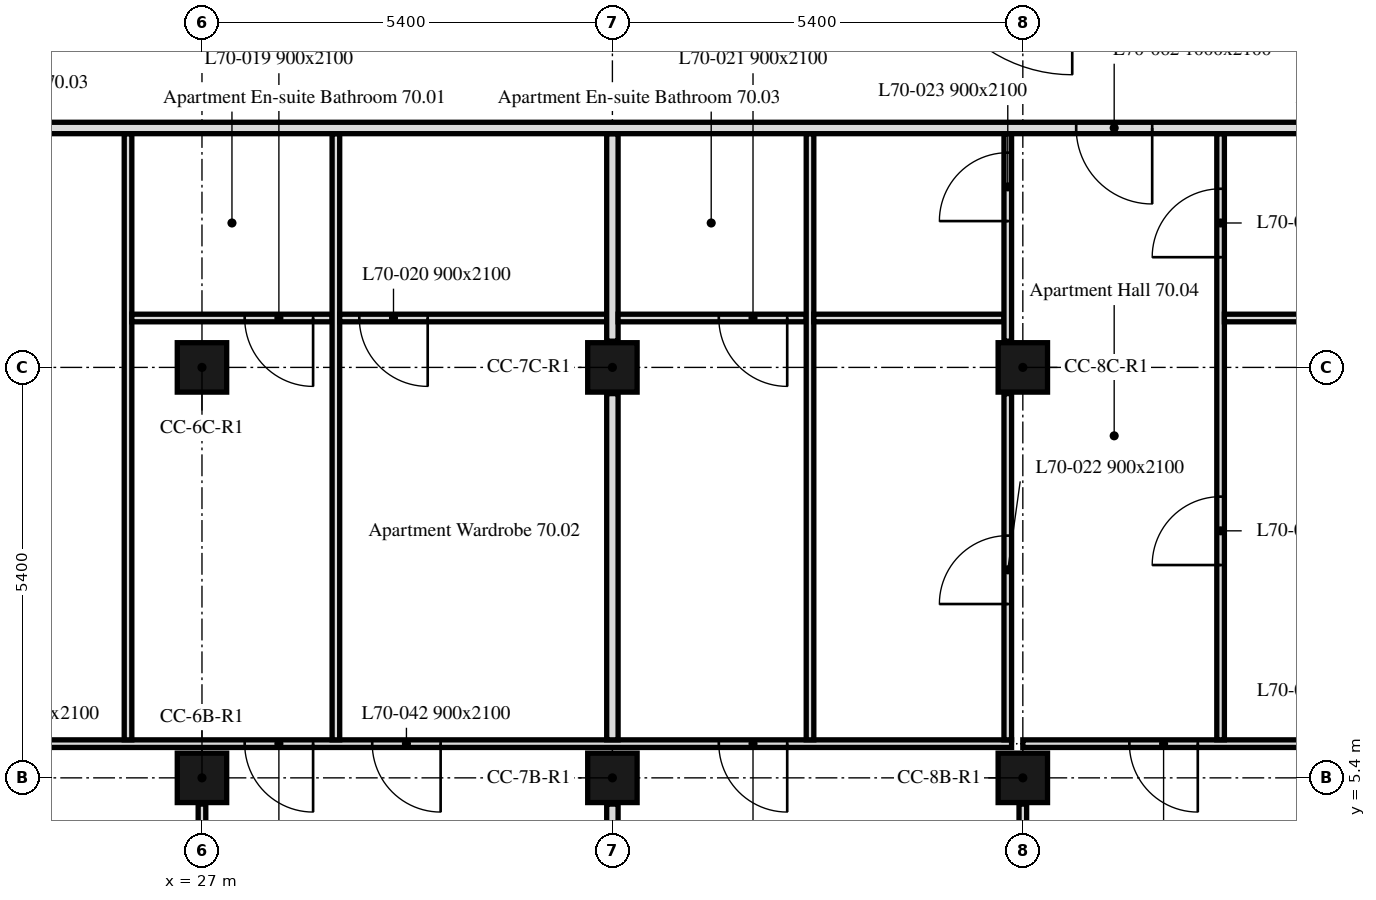
"""IFC4 building model, lengths in metres.
Left out: names, types, materials, properties, quantities, classifications, styles, units other than length and angle.
Written with IfcOpenShell. Run it as: python <this file> out.ifc"""

import sys

from ifc_helpers import new_model, si_unit, direction, frame, frame_2d, origin, origin_2d, place, context, subcontext, project, spatial, rectangle, extrude, element, fill, save


model = new_model("IFC4")
c1 = context("Model", 3, precision=1e-05, world=origin(), true_north=direction((0.0, 1.0)))
c2 = subcontext(c1, "Body", "Model", "MODEL_VIEW")
j1 = project(units=[si_unit("LENGTHUNIT", "METRE"), si_unit("PLANEANGLEUNIT", "RADIAN")], contexts=[c1])
p1 = place(None, origin())
s1 = spatial("IfcSite", under=j1, at=p1, CompositionType="ELEMENT")
p2 = place(p1, origin())
s2 = spatial("IfcBuilding", under=s1, at=p2, CompositionType="ELEMENT")
p3 = place(p2, frame((0.0, 0.0, 285.1)))
s3 = spatial("IfcBuildingStorey", under=s2, at=p3, CompositionType="ELEMENT", Elevation=285.1)
for number, where, z_axis, x_axis in (
    (1, (27.0, 5.4, 0.0), (0.0, 0.0, 1.0), (1.0, 0.0, 0.0)),
    (2, (32.4, 5.4, 0.0), (0.0, 0.0, 1.0), (1.0, 0.0, 0.0)),
    (3, (37.8, 5.4, 0.0), (0.0, 0.0, 1.0), (1.0, 0.0, 0.0)),
    (4, (27.0, 10.8, 0.0), (0.0, 0.0, 1.0), (1.0, 0.0, 0.0)),
    (5, (32.4, 10.8, 0.0), (0.0, 0.0, 1.0), (1.0, 0.0, 0.0)),
    (6, (37.8, 10.8, 0.0), (0.0, 0.0, 1.0), (1.0, 0.0, 0.0)),
):
    element("IfcColumn", number, at=place(p3, frame(where, z_axis=z_axis, x_axis=x_axis)), inside=s3, PredefinedType="COLUMN", context=c2, shape_type="SweptSolid", body=[
        extrude(rectangle(XDim=0.65, YDim=0.65, at=origin_2d()), origin(), (0.0, 0.0, 1.0), 3.0),
    ])
p4 = place(p3, frame((37.652, 5.85, 0.0), z_axis=(0.0, 0.0, 1.0), x_axis=(-1.0, 0.0, 0.0)))
e7 = element("IfcWall", 7, at=p4, inside=s3, PredefinedType="PARTITIONING", context=c2, shape_type="SweptSolid", body=[
    extrude(rectangle(XDim=31.501, YDim=0.1, at=frame_2d((15.75, 0.0))), origin(), (0.0, 0.0, 1.0), 2.4),
])
p5 = place(p4, frame((12.923, 0.0, 0.0)))
e8 = element("IfcOpeningElement", 8, at=p5, cuts=e7, PredefinedType="OPENING", context=c2, shape_type="SweptSolid", body=[
    extrude(rectangle(XDim=0.9, YDim=2.1, at=frame_2d((0.45, 1.05))), frame((0.0, 0.05, 0.0), z_axis=(0.0, -1.0, 0.0), x_axis=(1.0, 0.0, 0.0)), (0.0, 0.0, 1.0), 0.1),
])
p6 = place(p4, frame((29.422, 0.0, 0.0)))
e9 = element("IfcOpeningElement", 9, at=p6, cuts=e7, PredefinedType="OPENING", context=c2, shape_type="SweptSolid", body=[
    extrude(rectangle(XDim=0.9, YDim=2.1, at=frame_2d((0.45, 1.05))), frame((0.0, 0.05, 0.0), z_axis=(0.0, -1.0, 0.0), x_axis=(1.0, 0.0, 0.0)), (0.0, 0.0, 1.0), 0.1),
])
p7 = place(p4, frame((28.182, 0.0, 0.0)))
e10 = element("IfcOpeningElement", 10, at=p7, cuts=e7, PredefinedType="OPENING", context=c2, shape_type="SweptSolid", body=[
    extrude(rectangle(XDim=0.9, YDim=2.1, at=frame_2d((0.45, 1.05))), frame((0.0, 0.05, 0.0), z_axis=(0.0, -1.0, 0.0), x_axis=(1.0, 0.0, 0.0)), (0.0, 0.0, 1.0), 0.1),
])
p8 = place(p4, frame((23.942, 0.0, 0.0)))
e11 = element("IfcOpeningElement", 11, at=p8, cuts=e7, PredefinedType="OPENING", context=c2, shape_type="SweptSolid", body=[
    extrude(rectangle(XDim=0.9, YDim=2.1, at=frame_2d((0.45, 1.05))), frame((0.0, 0.05, 0.0), z_axis=(0.0, -1.0, 0.0), x_axis=(1.0, 0.0, 0.0)), (0.0, 0.0, 1.0), 0.1),
])
p9 = place(p4, frame((22.572, 0.0, 0.0)))
e12 = element("IfcOpeningElement", 12, at=p9, cuts=e7, PredefinedType="OPENING", context=c2, shape_type="SweptSolid", body=[
    extrude(rectangle(XDim=0.9, YDim=2.1, at=frame_2d((0.45, 1.05))), frame((0.0, 0.05, 0.0), z_axis=(0.0, -1.0, 0.0), x_axis=(1.0, 0.0, 0.0)), (0.0, 0.0, 1.0), 0.1),
])
p10 = place(p4, frame((19.466, 0.0, 0.0)))
e13 = element("IfcOpeningElement", 13, at=p10, cuts=e7, PredefinedType="OPENING", context=c2, shape_type="SweptSolid", body=[
    extrude(rectangle(XDim=0.9, YDim=2.1, at=frame_2d((0.45, 1.05))), frame((0.0, 0.05, 0.0), z_axis=(0.0, -1.0, 0.0), x_axis=(1.0, 0.0, 0.0)), (0.0, 0.0, 1.0), 0.1),
])
p11 = place(p4, frame((9.19, 0.0, 0.0)))
e14 = element("IfcOpeningElement", 14, at=p11, cuts=e7, PredefinedType="OPENING", context=c2, shape_type="SweptSolid", body=[
    extrude(rectangle(XDim=0.9, YDim=2.1, at=frame_2d((0.45, 1.05))), frame((0.0, 0.05, 0.0), z_axis=(0.0, -1.0, 0.0), x_axis=(1.0, 0.0, 0.0)), (0.0, 0.0, 1.0), 0.1),
])
p12 = place(p4, frame((7.512, 0.0, 0.0)))
e15 = element("IfcOpeningElement", 15, at=p12, cuts=e7, PredefinedType="OPENING", context=c2, shape_type="SweptSolid", body=[
    extrude(rectangle(XDim=0.9, YDim=2.1, at=frame_2d((0.45, 1.05))), frame((0.0, 0.05, 0.0), z_axis=(0.0, -1.0, 0.0), x_axis=(1.0, 0.0, 0.0)), (0.0, 0.0, 1.0), 0.1),
])
p13 = place(p4, frame((2.952, 0.0, 0.0)))
e16 = element("IfcOpeningElement", 16, at=p13, cuts=e7, PredefinedType="OPENING", context=c2, shape_type="SweptSolid", body=[
    extrude(rectangle(XDim=0.9, YDim=2.1, at=frame_2d((0.45, 1.05))), frame((0.0, 0.05, 0.0), z_axis=(0.0, -1.0, 0.0), x_axis=(1.0, 0.0, 0.0)), (0.0, 0.0, 1.0), 0.1),
])
p14 = place(p4, frame((18.096, 0.0, 0.0)))
e17 = element("IfcOpeningElement", 17, at=p14, cuts=e7, PredefinedType="OPENING", context=c2, shape_type="SweptSolid", body=[
    extrude(rectangle(XDim=0.9, YDim=2.1, at=frame_2d((0.45, 1.05))), frame((0.0, 0.05, 0.0), z_axis=(0.0, -1.0, 0.0), x_axis=(1.0, 0.0, 0.0)), (0.0, 0.0, 1.0), 0.1),
])
p15 = place(p3, frame((27.0, 0.751, 0.0), z_axis=(0.0, 0.0, 1.0), x_axis=(0.0, 1.0, 0.0)))
e18 = element("IfcWall", 18, at=p15, inside=s3, PredefinedType="PARTITIONING", context=c2, shape_type="SweptSolid", body=[
    extrude(rectangle(XDim=4.304, YDim=0.1, at=frame_2d((2.152, 0.0))), origin(), (0.0, 0.0, 1.0), 2.4),
])
p16 = place(p15, frame((1.18, 0.0, 0.0)))
e19 = element("IfcOpeningElement", 19, at=p16, cuts=e18, PredefinedType="OPENING", context=c2, shape_type="SweptSolid", body=[
    extrude(rectangle(XDim=0.9, YDim=2.1, at=frame_2d((0.45, 1.05))), frame((0.0, 0.05, 0.0), z_axis=(0.0, -1.0, 0.0), x_axis=(1.0, 0.0, 0.0)), (0.0, 0.0, 1.0), 0.1),
])
p17 = place(p3, frame((32.4, 0.751, 0.0), z_axis=(0.0, 0.0, 1.0), x_axis=(0.0, 1.0, 0.0)))
e20 = element("IfcWall", 20, at=p17, inside=s3, PredefinedType="PARTITIONING", context=c2, shape_type="SweptSolid", body=[
    extrude(rectangle(XDim=4.304, YDim=0.15, at=frame_2d((2.152, 0.0))), origin(), (0.0, 0.0, 1.0), 2.4),
])
p18 = place(p3, frame((26.027, 5.9, 0.0), z_axis=(0.0, 0.0, 1.0), x_axis=(0.0, 1.0, 0.0)))
e21 = element("IfcWall", 21, at=p18, inside=s3, PredefinedType="PARTITIONING", context=c2, shape_type="SweptSolid", body=[
    extrude(rectangle(XDim=7.975, YDim=0.1, at=frame_2d((3.988, 0.0))), origin(), (0.0, 0.0, 1.0), 3.0),
])
p19 = place(p3, frame((28.712, 11.45, 0.0), z_axis=(0.0, 0.0, 1.0), x_axis=(-1.0, 0.0, 0.0)))
e22 = element("IfcWall", 22, at=p19, inside=s3, PredefinedType="PARTITIONING", context=c2, shape_type="SweptSolid", body=[
    extrude(rectangle(XDim=2.635, YDim=0.1, at=frame_2d((1.317, 0.0))), origin(), (0.0, 0.0, 1.0), 2.4),
])
p20 = place(p19, frame((0.25, 0.0, 0.0)))
e23 = element("IfcOpeningElement", 23, at=p20, cuts=e22, PredefinedType="OPENING", context=c2, shape_type="SweptSolid", body=[
    extrude(rectangle(XDim=0.9, YDim=2.1, at=frame_2d((0.45, 1.05))), frame((0.0, 0.05, 0.0), z_axis=(0.0, -1.0, 0.0), x_axis=(1.0, 0.0, 0.0)), (0.0, 0.0, 1.0), 0.1),
])
p21 = place(p3, frame((28.762, 5.9, 0.0), z_axis=(0.0, 0.0, 1.0), x_axis=(0.0, 1.0, 0.0)))
e24 = element("IfcWall", 24, at=p21, inside=s3, PredefinedType="PARTITIONING", context=c2, shape_type="SweptSolid", body=[
    extrude(rectangle(XDim=7.975, YDim=0.1, at=frame_2d((3.988, 0.0))), origin(), (0.0, 0.0, 1.0), 3.0),
])
p22 = place(p3, frame((32.4, 5.9, 0.0), z_axis=(0.0, 0.0, 1.0), x_axis=(0.0, 1.0, 0.0)))
e25 = element("IfcWall", 25, at=p22, inside=s3, PredefinedType="PARTITIONING", context=c2, shape_type="SweptSolid", body=[
    extrude(rectangle(XDim=4.555, YDim=0.15, at=frame_2d((2.278, 0.0))), origin(), (0.0, 0.0, 1.0), 2.4),
])
p23 = place(p3, frame((32.325, 11.45, 0.0), z_axis=(0.0, 0.0, 1.0), x_axis=(-1.0, 0.0, 0.0)))
e26 = element("IfcWall", 26, at=p23, inside=s3, PredefinedType="PARTITIONING", context=c2, shape_type="SweptSolid", body=[
    extrude(rectangle(XDim=3.513, YDim=0.1, at=frame_2d((1.756, 0.0))), origin(), (0.0, 0.0, 1.0), 3.0),
])
p24 = place(p23, frame((2.355, 0.0, 0.0)))
e27 = element("IfcOpeningElement", 27, at=p24, cuts=e26, PredefinedType="OPENING", context=c2, shape_type="SweptSolid", body=[
    extrude(rectangle(XDim=0.9, YDim=2.1, at=frame_2d((0.45, 1.05))), frame((0.0, 0.05, 0.0), z_axis=(0.0, -1.0, 0.0), x_axis=(1.0, 0.0, 0.0)), (0.0, 0.0, 1.0), 0.1),
])
p25 = place(p3, frame((32.4, 11.145, 0.0), z_axis=(0.0, 0.0, 1.0), x_axis=(0.0, 1.0, 0.0)))
e28 = element("IfcWall", 28, at=p25, inside=s3, PredefinedType="PARTITIONING", context=c2, shape_type="SweptSolid", body=[
    extrude(rectangle(XDim=2.73, YDim=0.15, at=frame_2d((1.365, 0.0))), origin(), (0.0, 0.0, 1.0), 2.4),
])
p26 = place(p3, frame((37.8, 0.751, 0.0), z_axis=(0.0, 0.0, 1.0), x_axis=(0.0, 1.0, 0.0)))
e29 = element("IfcWall", 29, at=p26, inside=s3, PredefinedType="PARTITIONING", context=c2, shape_type="SweptSolid", body=[
    extrude(rectangle(XDim=4.304, YDim=0.1, at=frame_2d((2.152, 0.0))), origin(), (0.0, 0.0, 1.0), 2.4),
])
p27 = place(p26, frame((1.18, 0.0, 0.0)))
e30 = element("IfcOpeningElement", 30, at=p27, cuts=e29, PredefinedType="OPENING", context=c2, shape_type="SweptSolid", body=[
    extrude(rectangle(XDim=0.9, YDim=2.1, at=frame_2d((0.45, 1.05))), frame((0.0, 0.05, 0.0), z_axis=(0.0, -1.0, 0.0), x_axis=(1.0, 0.0, 0.0)), (0.0, 0.0, 1.0), 0.1),
])
p28 = place(p3, frame((43.15, 5.85, 0.0), z_axis=(0.0, 0.0, 1.0), x_axis=(-1.0, 0.0, 0.0)))
e31 = element("IfcWall", 31, at=p28, inside=s3, PredefinedType="PARTITIONING", context=c2, shape_type="SweptSolid", body=[
    extrude(rectangle(XDim=5.35, YDim=0.1, at=frame_2d((2.675, 0.0))), origin(), (0.0, 0.0, 1.0), 3.0),
])
p29 = place(p28, frame((3.048, 0.0, 0.0)))
e32 = element("IfcOpeningElement", 32, at=p29, cuts=e31, PredefinedType="OPENING", context=c2, shape_type="SweptSolid", body=[
    extrude(rectangle(XDim=0.9, YDim=2.1, at=frame_2d((0.45, 1.05))), frame((0.0, 0.05, 0.0), z_axis=(0.0, -1.0, 0.0), x_axis=(1.0, 0.0, 0.0)), (0.0, 0.0, 1.0), 0.1),
])
p30 = place(p3, frame((34.95, 11.45, 0.0), z_axis=(0.0, 0.0, 1.0), x_axis=(-1.0, 0.0, 0.0)))
e33 = element("IfcWall", 33, at=p30, inside=s3, PredefinedType="PARTITIONING", context=c2, shape_type="SweptSolid", body=[
    extrude(rectangle(XDim=2.475, YDim=0.1, at=frame_2d((1.237, 0.0))), origin(), (0.0, 0.0, 1.0), 3.0),
])
p31 = place(p30, frame((0.25, 0.0, 0.0)))
e34 = element("IfcOpeningElement", 34, at=p31, cuts=e33, PredefinedType="OPENING", context=c2, shape_type="SweptSolid", body=[
    extrude(rectangle(XDim=0.9, YDim=2.1, at=frame_2d((0.45, 1.05))), frame((0.0, 0.05, 0.0), z_axis=(0.0, -1.0, 0.0), x_axis=(1.0, 0.0, 0.0)), (0.0, 0.0, 1.0), 0.1),
])
p32 = place(p3, frame((35.0, 5.9, 0.0), z_axis=(0.0, 0.0, 1.0), x_axis=(0.0, 1.0, 0.0)))
e35 = element("IfcWall", 35, at=p32, inside=s3, PredefinedType="PARTITIONING", context=c2, shape_type="SweptSolid", body=[
    extrude(rectangle(XDim=7.975, YDim=0.1, at=frame_2d((3.988, 0.0))), origin(), (0.0, 0.0, 1.0), 2.4),
])
p33 = place(p3, frame((37.602, 5.9, 0.0), z_axis=(0.0, 0.0, 1.0), x_axis=(0.0, 1.0, 0.0)))
e36 = element("IfcWall", 36, at=p33, inside=s3, PredefinedType="PARTITIONING", context=c2, shape_type="SweptSolid", body=[
    extrude(rectangle(XDim=4.555, YDim=0.1, at=frame_2d((2.278, 0.0))), origin(), (0.0, 0.0, 1.0), 2.4),
])
p34 = place(p33, frame((1.787, 0.0, 0.0)))
e37 = element("IfcOpeningElement", 37, at=p34, cuts=e36, PredefinedType="OPENING", context=c2, shape_type="SweptSolid", body=[
    extrude(rectangle(XDim=0.9, YDim=2.1, at=frame_2d((0.45, 1.05))), frame((0.0, 0.05, 0.0), z_axis=(0.0, -1.0, 0.0), x_axis=(1.0, 0.0, 0.0)), (0.0, 0.0, 1.0), 0.1),
])
p35 = place(p3, frame((37.552, 11.45, 0.0), z_axis=(0.0, 0.0, 1.0), x_axis=(-1.0, 0.0, 0.0)))
e38 = element("IfcWall", 38, at=p35, inside=s3, PredefinedType="PARTITIONING", context=c2, shape_type="SweptSolid", body=[
    extrude(rectangle(XDim=2.502, YDim=0.1, at=frame_2d((1.251, 0.0))), origin(), (0.0, 0.0, 1.0), 3.0),
])
p36 = place(p3, frame((37.602, 11.145, 0.0), z_axis=(0.0, 0.0, 1.0), x_axis=(0.0, 1.0, 0.0)))
e39 = element("IfcWall", 39, at=p36, inside=s3, PredefinedType="PARTITIONING", context=c2, shape_type="SweptSolid", body=[
    extrude(rectangle(XDim=2.73, YDim=0.1, at=frame_2d((1.365, 0.0))), origin(), (0.0, 0.0, 1.0), 2.4),
])
p37 = place(p36, frame((1.58, 0.0, 0.0)))
e40 = element("IfcOpeningElement", 40, at=p37, cuts=e39, PredefinedType="OPENING", context=c2, shape_type="SweptSolid", body=[
    extrude(rectangle(XDim=0.9, YDim=2.1, at=frame_2d((0.45, 1.05))), frame((0.0, 0.05, 0.0), z_axis=(0.0, -1.0, 0.0), x_axis=(1.0, 0.0, 0.0)), (0.0, 0.0, 1.0), 0.1),
])
p38 = place(p3, frame((40.402, 5.9, 0.0), z_axis=(0.0, 0.0, 1.0), x_axis=(0.0, 1.0, 0.0)))
e41 = element("IfcWall", 41, at=p38, inside=s3, PredefinedType="PARTITIONING", context=c2, shape_type="SweptSolid", body=[
    extrude(rectangle(XDim=7.975, YDim=0.1, at=frame_2d((3.988, 0.0))), origin(), (0.0, 0.0, 1.0), 2.4),
])
p39 = place(p38, frame((2.3, 0.0, 0.0)))
e42 = element("IfcOpeningElement", 42, at=p39, cuts=e41, PredefinedType="OPENING", context=c2, shape_type="SweptSolid", body=[
    extrude(rectangle(XDim=0.9, YDim=2.1, at=frame_2d((0.45, 1.05))), frame((0.0, 0.05, 0.0), z_axis=(0.0, -1.0, 0.0), x_axis=(1.0, 0.0, 0.0)), (0.0, 0.0, 1.0), 0.1),
])
p40 = place(p38, frame((6.35, 0.0, 0.0)))
e43 = element("IfcOpeningElement", 43, at=p40, cuts=e41, PredefinedType="OPENING", context=c2, shape_type="SweptSolid", body=[
    extrude(rectangle(XDim=0.9, YDim=2.1, at=frame_2d((0.45, 1.05))), frame((0.0, 0.05, 0.0), z_axis=(0.0, -1.0, 0.0), x_axis=(1.0, 0.0, 0.0)), (0.0, 0.0, 1.0), 0.1),
])
p41 = place(p3, frame((43.231, 11.45, 0.0), z_axis=(0.0, 0.0, 1.0), x_axis=(-1.0, 0.0, 0.0)))
e44 = element("IfcWall", 44, at=p41, inside=s3, PredefinedType="PARTITIONING", context=c2, shape_type="SweptSolid", body=[
    extrude(rectangle(XDim=2.779, YDim=0.1, at=frame_2d((1.39, 0.0))), origin(), (0.0, 0.0, 1.0), 3.0),
])
p42 = place(p3, frame((47.849, 13.95, 0.0), z_axis=(0.0, 0.0, 1.0), x_axis=(-1.0, 0.0, 0.0)))
e45 = element("IfcWall", 45, at=p42, inside=s3, PredefinedType="PARTITIONING", context=c2, shape_type="SweptSolid", body=[
    extrude(rectangle(XDim=41.698, YDim=0.15, at=frame_2d((20.849, 0.0))), origin(), (0.0, 0.0, 1.0), 2.4),
])
p43 = place(p42, frame((37.749, 0.0, 0.0)))
e46 = element("IfcOpeningElement", 46, at=p43, cuts=e45, PredefinedType="OPENING", context=c2, shape_type="SweptSolid", body=[
    extrude(rectangle(XDim=1.0, YDim=2.1, at=frame_2d((0.5, 1.05))), frame((0.0, 0.075, 0.0), z_axis=(0.0, -1.0, 0.0), x_axis=(1.0, 0.0, 0.0)), (0.0, 0.0, 1.0), 0.15),
])
p44 = place(p42, frame((32.244, 0.0, 0.0)))
e47 = element("IfcOpeningElement", 47, at=p44, cuts=e45, PredefinedType="OPENING", context=c2, shape_type="SweptSolid", body=[
    extrude(rectangle(XDim=1.0, YDim=2.1, at=frame_2d((0.5, 1.05))), frame((0.0, 0.075, 0.0), z_axis=(0.0, -1.0, 0.0), x_axis=(1.0, 0.0, 0.0)), (0.0, 0.0, 1.0), 0.15),
])
p45 = place(p42, frame((27.735, 0.0, 0.0)))
e48 = element("IfcOpeningElement", 48, at=p45, cuts=e45, PredefinedType="OPENING", context=c2, shape_type="SweptSolid", body=[
    extrude(rectangle(XDim=1.0, YDim=2.1, at=frame_2d((0.5, 1.05))), frame((0.0, 0.075, 0.0), z_axis=(0.0, -1.0, 0.0), x_axis=(1.0, 0.0, 0.0)), (0.0, 0.0, 1.0), 0.15),
])
p46 = place(p42, frame((8.347, 0.0, 0.0)))
e49 = element("IfcOpeningElement", 49, at=p46, cuts=e45, PredefinedType="OPENING", context=c2, shape_type="SweptSolid", body=[
    extrude(rectangle(XDim=1.0, YDim=2.1, at=frame_2d((0.5, 1.05))), frame((0.0, 0.075, 0.0), z_axis=(0.0, -1.0, 0.0), x_axis=(1.0, 0.0, 0.0)), (0.0, 0.0, 1.0), 0.15),
])
p47 = place(p20, origin())
e50 = element("IfcDoor", 50, at=p47, inside=s3, OperationType="SINGLE_SWING_LEFT", PredefinedType="DOOR", context=c2, shape_type="SweptSolid", body=[
    extrude(rectangle(XDim=0.9, YDim=2.1, at=frame_2d((0.45, 1.05))), frame((0.0, 0.025, 0.0), z_axis=(0.0, -1.0, 0.0), x_axis=(1.0, 0.0, 0.0)), (0.0, 0.0, 1.0), 0.05),
])
fill(e23, e50)
p48 = place(p24, origin())
e51 = element("IfcDoor", 51, at=p48, inside=s3, OperationType="SINGLE_SWING_LEFT", PredefinedType="DOOR", context=c2, shape_type="SweptSolid", body=[
    extrude(rectangle(XDim=0.9, YDim=2.1, at=frame_2d((0.45, 1.05))), frame((0.0, 0.025, 0.0), z_axis=(0.0, -1.0, 0.0), x_axis=(1.0, 0.0, 0.0)), (0.0, 0.0, 1.0), 0.05),
])
fill(e27, e51)
p49 = place(p31, origin())
e52 = element("IfcDoor", 52, at=p49, inside=s3, OperationType="SINGLE_SWING_RIGHT", PredefinedType="DOOR", context=c2, shape_type="SweptSolid", body=[
    extrude(rectangle(XDim=0.9, YDim=2.1, at=frame_2d((0.45, 1.05))), frame((0.0, 0.025, 0.0), z_axis=(0.0, -1.0, 0.0), x_axis=(1.0, 0.0, 0.0)), (0.0, 0.0, 1.0), 0.05),
])
fill(e34, e52)
p50 = place(p34, origin())
e53 = element("IfcDoor", 53, at=p50, inside=s3, OperationType="SINGLE_SWING_LEFT", PredefinedType="DOOR", context=c2, shape_type="SweptSolid", body=[
    extrude(rectangle(XDim=0.9, YDim=2.1, at=frame_2d((0.45, 1.05))), frame((0.0, 0.025, 0.0), z_axis=(0.0, -1.0, 0.0), x_axis=(1.0, 0.0, 0.0)), (0.0, 0.0, 1.0), 0.05),
])
fill(e37, e53)
p51 = place(p37, origin())
e54 = element("IfcDoor", 54, at=p51, inside=s3, OperationType="SINGLE_SWING_RIGHT", PredefinedType="DOOR", context=c2, shape_type="SweptSolid", body=[
    extrude(rectangle(XDim=0.9, YDim=2.1, at=frame_2d((0.45, 1.05))), frame((0.0, 0.025, 0.0), z_axis=(0.0, -1.0, 0.0), x_axis=(1.0, 0.0, 0.0)), (0.0, 0.0, 1.0), 0.05),
])
fill(e40, e54)
p52 = place(p39, origin())
e55 = element("IfcDoor", 55, at=p52, inside=s3, OperationType="SINGLE_SWING_RIGHT", PredefinedType="DOOR", context=c2, shape_type="SweptSolid", body=[
    extrude(rectangle(XDim=0.9, YDim=2.1, at=frame_2d((0.45, 1.05))), frame((0.0, 0.025, 0.0), z_axis=(0.0, -1.0, 0.0), x_axis=(1.0, 0.0, 0.0)), (0.0, 0.0, 1.0), 0.05),
])
fill(e42, e55)
p53 = place(p40, origin())
e56 = element("IfcDoor", 56, at=p53, inside=s3, OperationType="SINGLE_SWING_RIGHT", PredefinedType="DOOR", context=c2, shape_type="SweptSolid", body=[
    extrude(rectangle(XDim=0.9, YDim=2.1, at=frame_2d((0.45, 1.05))), frame((0.0, 0.025, 0.0), z_axis=(0.0, -1.0, 0.0), x_axis=(1.0, 0.0, 0.0)), (0.0, 0.0, 1.0), 0.05),
])
fill(e43, e56)
p54 = place(p11, origin())
e57 = element("IfcDoor", 57, at=p54, inside=s3, OperationType="SINGLE_SWING_LEFT", PredefinedType="DOOR", context=c2, shape_type="SweptSolid", body=[
    extrude(rectangle(XDim=0.9, YDim=2.1, at=frame_2d((0.45, 1.05))), frame((0.0, 0.025, 0.0), z_axis=(0.0, -1.0, 0.0), x_axis=(1.0, 0.0, 0.0)), (0.0, 0.0, 1.0), 0.05),
])
fill(e14, e57)
p55 = place(p12, origin())
e58 = element("IfcDoor", 58, at=p55, inside=s3, OperationType="SINGLE_SWING_RIGHT", PredefinedType="DOOR", context=c2, shape_type="SweptSolid", body=[
    extrude(rectangle(XDim=0.9, YDim=2.1, at=frame_2d((0.45, 1.05))), frame((0.0, 0.025, 0.0), z_axis=(0.0, -1.0, 0.0), x_axis=(1.0, 0.0, 0.0)), (0.0, 0.0, 1.0), 0.05),
])
fill(e15, e58)
p56 = place(p13, origin())
e59 = element("IfcDoor", 59, at=p56, inside=s3, OperationType="SINGLE_SWING_RIGHT", PredefinedType="DOOR", context=c2, shape_type="SweptSolid", body=[
    extrude(rectangle(XDim=0.9, YDim=2.1, at=frame_2d((0.45, 1.05))), frame((0.0, 0.025, 0.0), z_axis=(0.0, -1.0, 0.0), x_axis=(1.0, 0.0, 0.0)), (0.0, 0.0, 1.0), 0.05),
])
fill(e16, e59)
p57 = place(p29, origin())
e60 = element("IfcDoor", 60, at=p57, inside=s3, OperationType="SINGLE_SWING_RIGHT", PredefinedType="DOOR", context=c2, shape_type="SweptSolid", body=[
    extrude(rectangle(XDim=0.9, YDim=2.1, at=frame_2d((0.45, 1.05))), frame((0.0, 0.025, 0.0), z_axis=(0.0, -1.0, 0.0), x_axis=(1.0, 0.0, 0.0)), (0.0, 0.0, 1.0), 0.05),
])
fill(e32, e60)
p58 = place(p46, origin())
e61 = element("IfcDoor", 61, at=p58, inside=s3, OperationType="SINGLE_SWING_LEFT", PredefinedType="DOOR", context=c2, shape_type="SweptSolid", body=[
    extrude(rectangle(XDim=1.0, YDim=2.1, at=frame_2d((0.5, 1.05))), frame((0.0, 0.025, 0.0), z_axis=(0.0, -1.0, 0.0), x_axis=(1.0, 0.0, 0.0)), (0.0, 0.0, 1.0), 0.05),
])
fill(e49, e61)
save(model, sys.argv[1])
